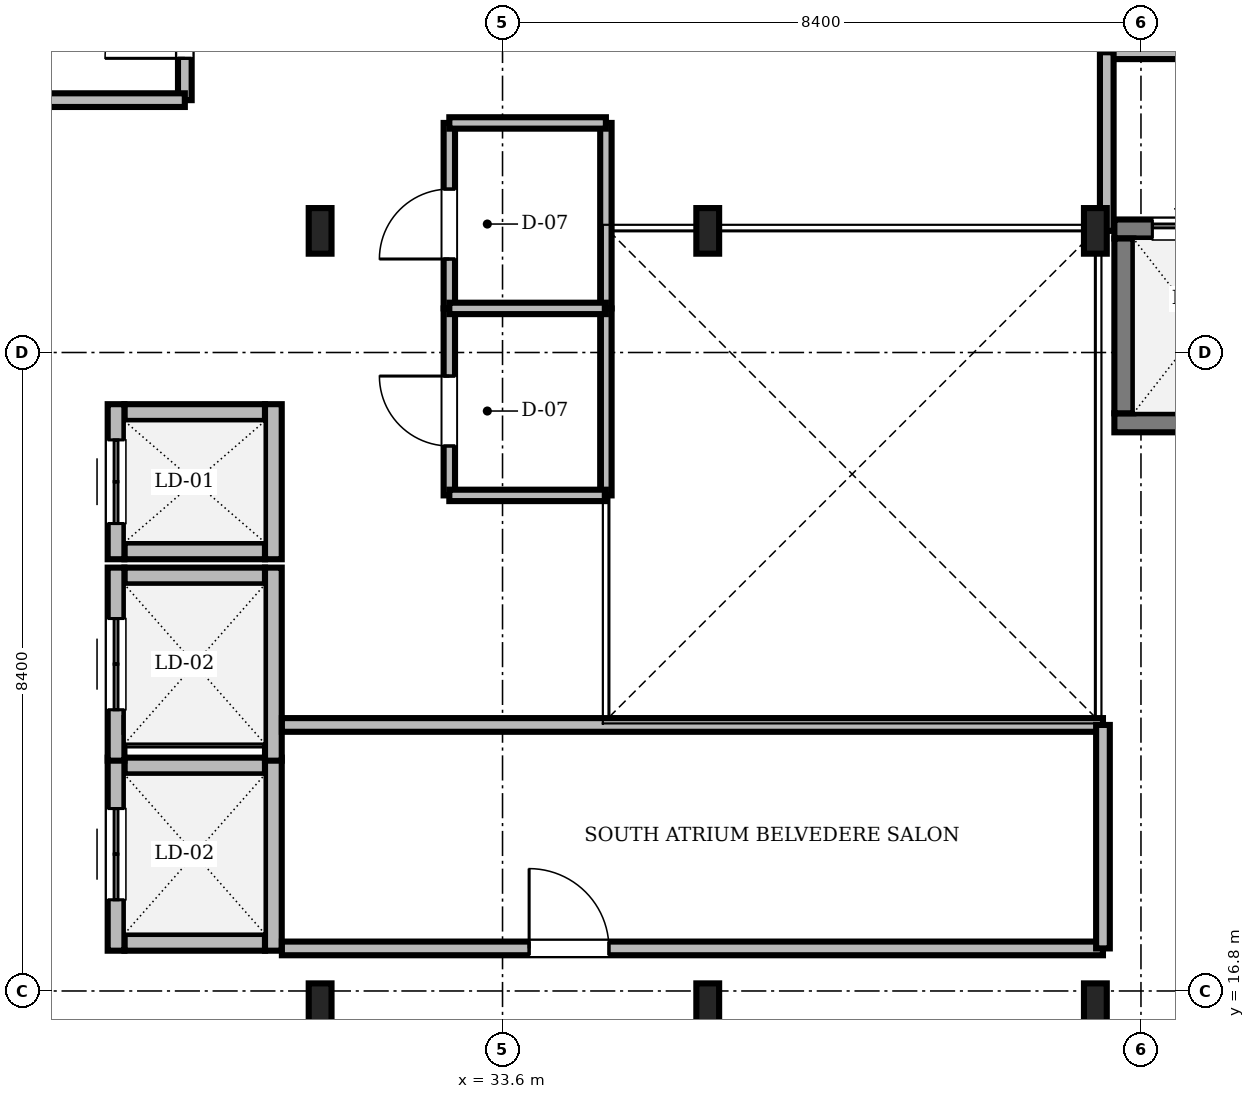
"""IFC4 building model, lengths in metres.
Left out: names, types, materials, properties, quantities, classifications, styles, units other than length and angle.
Written with IfcOpenShell. Run it as: python <this file> out.ifc"""

import sys

from ifc_helpers import new_model, si_unit, direction, frame, frame_2d, origin, origin_2d, place, context, subcontext, project, spatial, rectangle, i_section, extrude, source, transform, mapped, element, fill, save


model = new_model("IFC4")
c1 = context("Model", 3, precision=1e-05, world=origin(), true_north=direction((0.0, 1.0)))
c2 = subcontext(c1, "Body", "Model", "MODEL_VIEW")
j1 = project(units=[si_unit("LENGTHUNIT", "METRE"), si_unit("PLANEANGLEUNIT", "RADIAN")], contexts=[c1])
p1 = place(None, origin())
s1 = spatial("IfcSite", under=j1, at=p1, CompositionType="ELEMENT")
p2 = place(p1, origin())
s2 = spatial("IfcBuilding", under=s1, at=p2, CompositionType="ELEMENT")
p3 = place(p2, frame((0.0, 0.0, 291.15)))
s3 = spatial("IfcBuildingStorey", under=s2, at=p3, CompositionType="ELEMENT", Elevation=291.15)
m1 = source(origin(), c2, "Body", "SweptSolid", [
    extrude(i_section(OverallWidth=0.3, OverallDepth=0.6, WebThickness=0.015, FlangeThickness=0.03, FilletRadius=0.027, at=origin_2d()), origin(), (0.0, 0.0, 1.0), 4.7),
])
for number, where, z_axis, x_axis in (
    (1, (31.2, 16.6, 0.0), (0.0, 0.0, 1.0), (1.0, 0.0, 0.0)),
    (2, (36.3, 16.6, 0.0), (0.0, 0.0, 1.0), (1.0, 0.0, 0.0)),
    (3, (41.4, 16.6, 0.0), (0.0, 0.0, 1.0), (1.0, 0.0, 0.0)),
    (4, (41.4, 26.8, 0.0), (0.0, 0.0, 1.0), (1.0, 0.0, 0.0)),
    (5, (36.3, 26.8, 0.0), (0.0, 0.0, 1.0), (1.0, 0.0, 0.0)),
    (6, (31.2, 26.8, 0.0), (0.0, 0.0, 1.0), (1.0, 0.0, 0.0)),
):
    element("IfcColumn", number, at=place(p3, frame(where, z_axis=z_axis, x_axis=x_axis)), inside=s3, PredefinedType="COLUMN", context=c2, shape_type="MappedRepresentation", body=[
        mapped(m1, transform((0.0, 0.0, 0.0), scale=1.0)),
    ])
m2 = source(origin(), c2, "Body", "SweptSolid", [
    extrude(rectangle(XDim=1.85, YDim=0.22, at=frame_2d((0.925, 0.0))), origin(), (0.0, 0.0, 1.0), 4.7),
])
for number, where, z_axis, x_axis in (
    (7, (28.625, 17.44, 0.0), (0.0, 0.0, 1.0), (1.0, 0.0, 0.0)),
    (8, (28.625, 19.76, 0.0), (0.0, 0.0, 1.0), (1.0, 0.0, 0.0)),
):
    element("IfcWall", number, at=place(p3, frame(where, z_axis=z_axis, x_axis=x_axis)), inside=s3, PredefinedType="SOLIDWALL", context=c2, shape_type="MappedRepresentation", body=[
        mapped(m2, transform((0.0, 0.0, 0.0), scale=1.0)),
    ])
m3 = source(origin(), c2, "Body", "SweptSolid", [
    extrude(rectangle(XDim=2.54, YDim=0.22, at=frame_2d((1.27, 0.0))), origin(), (0.0, 0.0, 1.0), 4.7),
])
p4 = place(p3, frame((28.515, 17.33, 0.0), z_axis=(0.0, 0.0, 1.0), x_axis=(0.0, 1.0, 0.0)))
e9 = element("IfcWall", 9, at=p4, inside=s3, PredefinedType="SOLIDWALL", context=c2, shape_type="MappedRepresentation", body=[
    mapped(m3, transform((0.0, 0.0, 0.0), scale=1.0)),
])
m4 = source(origin(), c2, "Body", "SweptSolid", [
    extrude(rectangle(XDim=1.2, YDim=2.25, at=frame_2d((0.6, 1.125))), frame((0.0, 0.12, 0.0), z_axis=(0.0, -1.0, 0.0), x_axis=(1.0, 0.0, 0.0)), (0.0, 0.0, 1.0), 0.24),
])
p5 = place(p4, frame((0.67, 0.0, 0.0)))
e10 = element("IfcOpeningElement", 10, at=p5, cuts=e9, PredefinedType="OPENING", context=c2, shape_type="MappedRepresentation", body=[
    mapped(m4, transform((0.0, 0.0, 0.0), scale=1.0)),
])
p6 = place(p3, frame((30.585, 17.33, 0.0), z_axis=(0.0, 0.0, 1.0), x_axis=(0.0, 1.0, 0.0)))
e11 = element("IfcWall", 11, at=p6, inside=s3, PredefinedType="SOLIDWALL", context=c2, shape_type="MappedRepresentation", body=[
    mapped(m3, transform((0.0, 0.0, 0.0), scale=1.0)),
])
p7 = place(p3, frame((28.625, 22.26, 0.0), z_axis=(0.0, 0.0, 1.0), x_axis=(1.0, 0.0, 0.0)))
e12 = element("IfcWall", 12, at=p7, inside=s3, PredefinedType="SOLIDWALL", context=c2, shape_type="MappedRepresentation", body=[
    mapped(m2, transform((0.0, 0.0, 0.0), scale=1.0)),
])
p8 = place(p3, frame((28.515, 19.83, 0.0), z_axis=(0.0, 0.0, 1.0), x_axis=(0.0, 1.0, 0.0)))
e13 = element("IfcWall", 13, at=p8, inside=s3, PredefinedType="SOLIDWALL", context=c2, shape_type="MappedRepresentation", body=[
    mapped(m3, transform((0.0, 0.0, 0.0), scale=1.0)),
])
p9 = place(p8, frame((0.67, 0.0, 0.0)))
e14 = element("IfcOpeningElement", 14, at=p9, cuts=e13, PredefinedType="OPENING", context=c2, shape_type="MappedRepresentation", body=[
    mapped(m4, transform((0.0, 0.0, 0.0), scale=1.0)),
])
p10 = place(p3, frame((30.585, 19.83, 0.0), z_axis=(0.0, 0.0, 1.0), x_axis=(0.0, 1.0, 0.0)))
e15 = element("IfcWall", 15, at=p10, inside=s3, PredefinedType="SOLIDWALL", context=c2, shape_type="MappedRepresentation", body=[
    mapped(m3, transform((0.0, 0.0, 0.0), scale=1.0)),
])
for number, where, z_axis, x_axis in (
    (16, (28.625, 22.59, 0.0), (0.0, 0.0, 1.0), (1.0, 0.0, 0.0)),
    (17, (28.625, 24.41, 0.0), (0.0, 0.0, 1.0), (1.0, 0.0, 0.0)),
):
    element("IfcWall", number, at=place(p3, frame(where, z_axis=z_axis, x_axis=x_axis)), inside=s3, PredefinedType="SOLIDWALL", context=c2, shape_type="MappedRepresentation", body=[
        mapped(m2, transform((0.0, 0.0, 0.0), scale=1.0)),
    ])
m5 = source(origin(), c2, "Body", "SweptSolid", [
    extrude(rectangle(XDim=2.04, YDim=0.22, at=frame_2d((1.02, 0.0))), origin(), (0.0, 0.0, 1.0), 4.7),
])
p11 = place(p3, frame((28.515, 22.48, 0.0), z_axis=(0.0, 0.0, 1.0), x_axis=(0.0, 1.0, 0.0)))
e18 = element("IfcWall", 18, at=p11, inside=s3, PredefinedType="SOLIDWALL", context=c2, shape_type="MappedRepresentation", body=[
    mapped(m5, transform((0.0, 0.0, 0.0), scale=1.0)),
])
m6 = source(origin(), c2, "Body", "SweptSolid", [
    extrude(rectangle(XDim=1.1, YDim=2.2, at=frame_2d((0.55, 1.1))), frame((0.0, 0.12, 0.0), z_axis=(0.0, -1.0, 0.0), x_axis=(1.0, 0.0, 0.0)), (0.0, 0.0, 1.0), 0.24),
])
p12 = place(p11, frame((0.47, 0.0, 0.0)))
e19 = element("IfcOpeningElement", 19, at=p12, cuts=e18, PredefinedType="OPENING", context=c2, shape_type="MappedRepresentation", body=[
    mapped(m6, transform((0.0, 0.0, 0.0), scale=1.0)),
])
p13 = place(p3, frame((30.585, 22.48, 0.0), z_axis=(0.0, 0.0, 1.0), x_axis=(0.0, 1.0, 0.0)))
e20 = element("IfcWall", 20, at=p13, inside=s3, PredefinedType="SOLIDWALL", context=c2, shape_type="MappedRepresentation", body=[
    mapped(m5, transform((0.0, 0.0, 0.0), scale=1.0)),
])
m7 = source(origin(), c2, "Body", "SweptSolid", [
    extrude(rectangle(XDim=2.3, YDim=0.25, at=frame_2d((1.15, 0.0))), origin(), (0.0, 0.0, 1.0), 4.7),
])
p14 = place(p3, frame((41.65, 24.275, 0.0), z_axis=(0.0, 0.0, 1.0), x_axis=(1.0, 0.0, 0.0)))
e21 = element("IfcWall", 21, at=p14, inside=s3, PredefinedType="SOLIDWALL", context=c2, shape_type="MappedRepresentation", body=[
    mapped(m7, transform((0.0, 0.0, 0.0), scale=1.0)),
])
p15 = place(p3, frame((41.65, 26.825, 0.0), z_axis=(0.0, 0.0, 1.0), x_axis=(1.0, 0.0, 0.0)))
e22 = element("IfcWall", 22, at=p15, inside=s3, PredefinedType="SOLIDWALL", context=c2, shape_type="MappedRepresentation", body=[
    mapped(m7, transform((0.0, 0.0, 0.0), scale=1.0)),
])
m8 = source(origin(), c2, "Body", "SweptSolid", [
    extrude(rectangle(XDim=1.3, YDim=2.3, at=frame_2d((0.65, 1.15))), frame((0.0, 0.135, 0.0), z_axis=(0.0, -1.0, 0.0), x_axis=(1.0, 0.0, 0.0)), (0.0, 0.0, 1.0), 0.27),
])
p16 = place(p15, frame((0.5, 0.0, 0.0)))
e23 = element("IfcOpeningElement", 23, at=p16, cuts=e22, PredefinedType="OPENING", context=c2, shape_type="MappedRepresentation", body=[
    mapped(m8, transform((0.0, 0.0, 0.0), scale=1.0)),
])
p17 = place(p3, frame((41.775, 24.4, 0.0), z_axis=(0.0, 0.0, 1.0), x_axis=(0.0, 1.0, 0.0)))
e24 = element("IfcWall", 24, at=p17, inside=s3, PredefinedType="SOLIDWALL", context=c2, shape_type="MappedRepresentation", body=[
    mapped(m7, transform((0.0, 0.0, 0.0), scale=1.0)),
])
m9 = source(origin(), c2, "Body", "SweptSolid", [
    extrude(rectangle(XDim=2.13, YDim=0.18, at=frame_2d((1.065, 0.0))), origin(), (0.0, 0.0, 1.0), 4.332),
])
p18 = place(p3, frame((29.42, 28.52, 0.0), z_axis=(0.0, 0.0, 1.0), x_axis=(0.0, 1.0, 0.0)))
e25 = element("IfcWall", 25, at=p18, inside=s3, PredefinedType="PARTITIONING", context=c2, shape_type="MappedRepresentation", body=[
    mapped(m9, transform((0.0, 0.0, 0.0), scale=1.0)),
])
m10 = source(origin(), c2, "Body", "SweptSolid", [
    extrude(rectangle(XDim=1.05, YDim=2.2, at=frame_2d((0.525, 1.1))), frame((0.0, 0.1, 0.0), z_axis=(0.0, -1.0, 0.0), x_axis=(1.0, 0.0, 0.0)), (0.0, 0.0, 1.0), 0.2),
])
p19 = place(p18, frame((0.55, 0.0, 0.0)))
e26 = element("IfcOpeningElement", 26, at=p19, cuts=e25, PredefinedType="OPENING", context=c2, shape_type="MappedRepresentation", body=[
    mapped(m10, transform((0.0, 0.0, 0.0), scale=1.0)),
])
m11 = source(origin(), c2, "Body", "SweptSolid", [
    extrude(rectangle(XDim=10.803, YDim=0.18, at=frame_2d((5.401, 0.0))), origin(), (0.0, 0.0, 1.0), 4.242),
])
p20 = place(p3, frame((30.697, 17.36, 0.0), z_axis=(0.0, 0.0, 1.0), x_axis=(1.0, 0.0, 0.0)))
e27 = element("IfcWall", 27, at=p20, inside=s3, PredefinedType="PARTITIONING", context=c2, shape_type="MappedRepresentation", body=[
    mapped(m11, transform((0.0, 0.0, 0.0), scale=1.0)),
])
p21 = place(p20, frame((3.253, 0.0, 0.0)))
e28 = element("IfcOpeningElement", 28, at=p21, cuts=e27, PredefinedType="OPENING", context=c2, shape_type="MappedRepresentation", body=[
    mapped(m10, transform((0.0, 0.0, 0.0), scale=1.0)),
])
m12 = source(origin(), c2, "Body", "SweptSolid", [
    extrude(rectangle(XDim=4.648, YDim=0.18, at=frame_2d((2.324, 0.0))), origin(), (0.0, 0.0, 1.0), 4.332),
])
p22 = place(p3, frame((41.55, 29.15, 0.0), z_axis=(0.0, 0.0, 1.0), x_axis=(1.0, 0.0, 0.0)))
e29 = element("IfcWall", 29, at=p22, inside=s3, PredefinedType="PARTITIONING", context=c2, shape_type="MappedRepresentation", body=[
    mapped(m12, transform((0.0, 0.0, 0.0), scale=1.0)),
])
m13 = source(origin(), c2, "Body", "SweptSolid", [
    extrude(rectangle(XDim=1.2, YDim=2.2, at=frame_2d((0.6, 1.1))), frame((0.0, 0.1, 0.0), z_axis=(0.0, -1.0, 0.0), x_axis=(1.0, 0.0, 0.0)), (0.0, 0.0, 1.0), 0.2),
])
p23 = place(p22, frame((1.6, 0.0, 0.0)))
e30 = element("IfcOpeningElement", 30, at=p23, cuts=e29, PredefinedType="OPENING", context=c2, shape_type="MappedRepresentation", body=[
    mapped(m13, transform((0.0, 0.0, 0.0), scale=1.0)),
])
m14 = source(origin(), c2, "Body", "SweptSolid", [
    extrude(rectangle(XDim=2.46, YDim=0.15, at=frame_2d((1.23, 0.0))), origin(), (0.0, 0.0, 1.0), 4.7),
])
p24 = place(p3, frame((32.9, 23.32, 0.0), z_axis=(0.0, 0.0, 1.0), x_axis=(0.0, 1.0, 0.0)))
e31 = element("IfcWall", 31, at=p24, inside=s3, PredefinedType="PARTITIONING", context=c2, shape_type="MappedRepresentation", body=[
    mapped(m14, transform((0.0, 0.0, 0.0), scale=1.0)),
])
m15 = source(origin(), c2, "Body", "SweptSolid", [
    extrude(rectangle(XDim=0.92, YDim=2.1, at=frame_2d((0.46, 1.05))), frame((0.0, 0.085, 0.0), z_axis=(0.0, -1.0, 0.0), x_axis=(1.0, 0.0, 0.0)), (0.0, 0.0, 1.0), 0.17),
])
p25 = place(p24, frame((0.65, 0.0, 0.0)))
e32 = element("IfcOpeningElement", 32, at=p25, cuts=e31, PredefinedType="OPENING", context=c2, shape_type="MappedRepresentation", body=[
    mapped(m15, transform((0.0, 0.0, 0.0), scale=1.0)),
])
m16 = source(origin(), c2, "Body", "SweptSolid", [
    extrude(rectangle(XDim=2.44, YDim=0.15, at=frame_2d((1.22, 0.0))), origin(), (0.0, 0.0, 1.0), 4.242),
])
p26 = place(p3, frame((32.9, 25.78, 0.0), z_axis=(0.0, 0.0, 1.0), x_axis=(0.0, 1.0, 0.0)))
e33 = element("IfcWall", 33, at=p26, inside=s3, PredefinedType="PARTITIONING", context=c2, shape_type="MappedRepresentation", body=[
    mapped(m16, transform((0.0, 0.0, 0.0), scale=1.0)),
])
p27 = place(p26, frame((0.65, 0.0, 0.0)))
e34 = element("IfcOpeningElement", 34, at=p27, cuts=e33, PredefinedType="OPENING", context=c2, shape_type="MappedRepresentation", body=[
    mapped(m15, transform((0.0, 0.0, 0.0), scale=1.0)),
])
m17 = source(origin(), c2, "Body", "SweptSolid", [
    extrude(rectangle(XDim=1.846, YDim=0.18, at=frame_2d((0.923, 0.0))), origin(), (0.0, 0.0, 1.0), 4.7),
])
p28 = place(p3, frame((28.627, 20.3, 0.0), z_axis=(0.0, 0.0, 1.0), x_axis=(1.0, 0.0, 0.0)))
e35 = element("IfcWall", 35, at=p28, inside=s3, PredefinedType="PARTITIONING", context=c2, shape_type="MappedRepresentation", body=[
    mapped(m17, transform((0.0, 0.0, 0.0), scale=1.0)),
])
p29 = place(p3, frame((30.697, 20.3, 0.0), z_axis=(0.0, 0.0, 1.0), x_axis=(1.0, 0.0, 0.0)))
e36 = element("IfcWall", 36, at=p29, inside=s3, PredefinedType="PARTITIONING", context=c2, shape_type="MappedRepresentation", body=[
    mapped(m11, transform((0.0, 0.0, 0.0), scale=1.0)),
])
m18 = source(origin(), c2, "Body", "SweptSolid", [
    extrude(rectangle(XDim=4.138, YDim=0.18, at=frame_2d((2.069, 0.0))), origin(), (0.0, 0.0, 1.0), 3.942),
])
p30 = place(p3, frame((25.282, 28.52, 0.0), z_axis=(0.0, 0.0, 1.0), x_axis=(1.0, 0.0, 0.0)))
e37 = element("IfcWall", 37, at=p30, inside=s3, PredefinedType="PARTITIONING", context=c2, shape_type="MappedRepresentation", body=[
    mapped(m18, transform((0.0, 0.0, 0.0), scale=1.0)),
])
m19 = source(origin(), c2, "Body", "SweptSolid", [
    extrude(rectangle(XDim=2.94, YDim=0.18, at=frame_2d((1.47, 0.0))), origin(), (0.0, 0.0, 1.0), 4.242),
])
p31 = place(p3, frame((41.5, 17.36, 0.0), z_axis=(0.0, 0.0, 1.0), x_axis=(0.0, 1.0, 0.0)))
e38 = element("IfcWall", 38, at=p31, inside=s3, PredefinedType="PARTITIONING", context=c2, shape_type="MappedRepresentation", body=[
    mapped(m19, transform((0.0, 0.0, 0.0), scale=1.0)),
])
p32 = place(p3, frame((34.96, 23.32, 0.0), z_axis=(0.0, 0.0, 1.0), x_axis=(0.0, 1.0, 0.0)))
e39 = element("IfcWall", 39, at=p32, inside=s3, PredefinedType="PARTITIONING", context=c2, shape_type="MappedRepresentation", body=[
    mapped(m14, transform((0.0, 0.0, 0.0), scale=1.0)),
])
p33 = place(p3, frame((34.96, 25.78, 0.0), z_axis=(0.0, 0.0, 1.0), x_axis=(0.0, 1.0, 0.0)))
e40 = element("IfcWall", 40, at=p33, inside=s3, PredefinedType="PARTITIONING", context=c2, shape_type="MappedRepresentation", body=[
    mapped(m16, transform((0.0, 0.0, 0.0), scale=1.0)),
])
m20 = source(origin(), c2, "Body", "SweptSolid", [
    extrude(rectangle(XDim=2.35, YDim=0.18, at=frame_2d((1.175, 0.0))), origin(), (0.0, 0.0, 1.0), 4.332),
])
p34 = place(p3, frame((41.55, 26.8, 0.0), z_axis=(0.0, 0.0, 1.0), x_axis=(0.0, 1.0, 0.0)))
e41 = element("IfcWall", 41, at=p34, inside=s3, PredefinedType="PARTITIONING", context=c2, shape_type="MappedRepresentation", body=[
    mapped(m20, transform((0.0, 0.0, 0.0), scale=1.0)),
])
m21 = source(origin(), c2, "Body", "SweptSolid", [
    extrude(rectangle(XDim=2.06, YDim=0.15, at=frame_2d((1.03, 0.0))), origin(), (0.0, 0.0, 1.0), 4.7),
])
p35 = place(p3, frame((32.9, 25.78, 0.0), z_axis=(0.0, 0.0, 1.0), x_axis=(1.0, 0.0, 0.0)))
e42 = element("IfcWall", 42, at=p35, inside=s3, PredefinedType="PARTITIONING", context=c2, shape_type="MappedRepresentation", body=[
    mapped(m21, transform((0.0, 0.0, 0.0), scale=1.0)),
])
m22 = source(origin(), c2, "Body", "SweptSolid", [
    extrude(rectangle(XDim=2.06, YDim=0.15, at=frame_2d((1.03, 0.0))), origin(), (0.0, 0.0, 1.0), 4.332),
])
p36 = place(p3, frame((32.9, 28.22, 0.0), z_axis=(0.0, 0.0, 1.0), x_axis=(1.0, 0.0, 0.0)))
e43 = element("IfcWall", 43, at=p36, inside=s3, PredefinedType="PARTITIONING", context=c2, shape_type="MappedRepresentation", body=[
    mapped(m22, transform((0.0, 0.0, 0.0), scale=1.0)),
])
p37 = place(p3, frame((32.9, 23.32, 0.0), z_axis=(0.0, 0.0, 1.0), x_axis=(1.0, 0.0, 0.0)))
e44 = element("IfcWall", 44, at=p37, inside=s3, PredefinedType="PARTITIONING", context=c2, shape_type="MappedRepresentation", body=[
    mapped(m21, transform((0.0, 0.0, 0.0), scale=1.0)),
])
m23 = source(origin(), c2, "Body", "SweptSolid", [
    extrude(rectangle(XDim=1.2, YDim=2.25, at=frame_2d((0.6, 1.125))), frame((0.0, 0.025, 0.0), z_axis=(0.0, -1.0, 0.0), x_axis=(1.0, 0.0, 0.0)), (0.0, 0.0, 1.0), 0.05),
])
p38 = place(p5, origin())
e45 = element("IfcDoor", 45, at=p38, inside=s3, OperationType="DOUBLE_DOOR_SLIDING", PredefinedType="DOOR", context=c2, shape_type="MappedRepresentation", body=[
    mapped(m23, transform((0.0, 0.0, 0.0), scale=1.0)),
])
fill(e10, e45)
p39 = place(p9, origin())
e46 = element("IfcDoor", 46, at=p39, inside=s3, OperationType="DOUBLE_DOOR_SLIDING", PredefinedType="DOOR", context=c2, shape_type="MappedRepresentation", body=[
    mapped(m23, transform((0.0, 0.0, 0.0), scale=1.0)),
])
fill(e14, e46)
m24 = source(origin(), c2, "Body", "SweptSolid", [
    extrude(rectangle(XDim=1.1, YDim=2.2, at=frame_2d((0.55, 1.1))), frame((0.0, 0.025, 0.0), z_axis=(0.0, -1.0, 0.0), x_axis=(1.0, 0.0, 0.0)), (0.0, 0.0, 1.0), 0.05),
])
p40 = place(p12, origin())
e47 = element("IfcDoor", 47, at=p40, inside=s3, OperationType="DOUBLE_DOOR_SLIDING", PredefinedType="DOOR", context=c2, shape_type="MappedRepresentation", body=[
    mapped(m24, transform((0.0, 0.0, 0.0), scale=1.0)),
])
fill(e19, e47)
m25 = source(origin(), c2, "Body", "SweptSolid", [
    extrude(rectangle(XDim=1.3, YDim=2.3, at=frame_2d((0.65, 1.15))), frame((0.0, 0.025, 0.0), z_axis=(0.0, -1.0, 0.0), x_axis=(1.0, 0.0, 0.0)), (0.0, 0.0, 1.0), 0.05),
])
p41 = place(p16, origin())
e48 = element("IfcDoor", 48, at=p41, inside=s3, OperationType="DOUBLE_DOOR_SLIDING", PredefinedType="DOOR", context=c2, shape_type="MappedRepresentation", body=[
    mapped(m25, transform((0.0, 0.0, 0.0), scale=1.0)),
])
fill(e23, e48)
m26 = source(origin(), c2, "Body", "SweptSolid", [
    extrude(rectangle(XDim=1.05, YDim=2.2, at=frame_2d((0.525, 1.1))), frame((0.0, 0.025, 0.0), z_axis=(0.0, -1.0, 0.0), x_axis=(1.0, 0.0, 0.0)), (0.0, 0.0, 1.0), 0.05),
])
p42 = place(p19, origin())
e49 = element("IfcDoor", 49, at=p42, inside=s3, OperationType="SINGLE_SWING_LEFT", PredefinedType="DOOR", context=c2, shape_type="MappedRepresentation", body=[
    mapped(m26, transform((0.0, 0.0, 0.0), scale=1.0)),
])
fill(e26, e49)
p43 = place(p21, origin())
e50 = element("IfcDoor", 50, at=p43, inside=s3, OperationType="SINGLE_SWING_LEFT", PredefinedType="DOOR", context=c2, shape_type="MappedRepresentation", body=[
    mapped(m26, transform((0.0, 0.0, 0.0), scale=1.0)),
])
fill(e28, e50)
m27 = source(origin(), c2, "Body", "SweptSolid", [
    extrude(rectangle(XDim=0.92, YDim=2.1, at=frame_2d((0.46, 1.05))), frame((0.0, 0.025, 0.0), z_axis=(0.0, -1.0, 0.0), x_axis=(1.0, 0.0, 0.0)), (0.0, 0.0, 1.0), 0.05),
])
p44 = place(p25, origin())
e51 = element("IfcDoor", 51, at=p44, inside=s3, OperationType="SINGLE_SWING_RIGHT", PredefinedType="DOOR", context=c2, shape_type="MappedRepresentation", body=[
    mapped(m27, transform((0.0, 0.0, 0.0), scale=1.0)),
])
fill(e32, e51)
p45 = place(p27, origin())
e52 = element("IfcDoor", 52, at=p45, inside=s3, OperationType="SINGLE_SWING_LEFT", PredefinedType="DOOR", context=c2, shape_type="MappedRepresentation", body=[
    mapped(m27, transform((0.0, 0.0, 0.0), scale=1.0)),
])
fill(e34, e52)
save(model, sys.argv[1])
